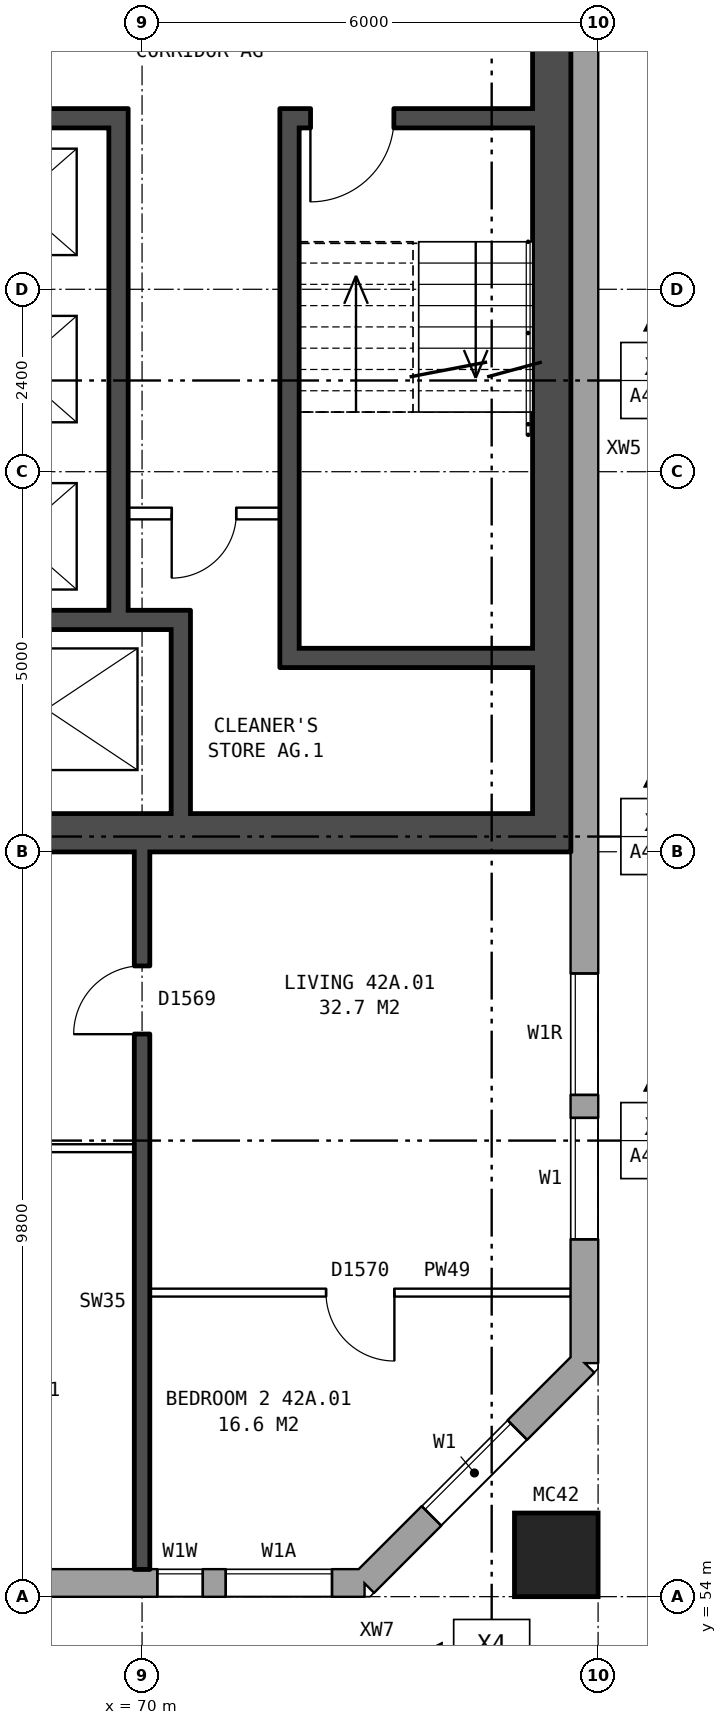
"""IFC4 building model, lengths in metres.
Left out: names, types, materials, properties, quantities, classifications, styles, units other than length and angle.
Written with IfcOpenShell. Run it as: python <this file> out.ifc"""

import sys

from ifc_helpers import new_model, si_unit, direction, frame, frame_2d, origin, origin_2d, place, context, subcontext, project, spatial, rectangle, hollow_rectangle, extrude, element, fill, save


model = new_model("IFC4")
c1 = context("Model", 3, precision=1e-05, world=origin(), true_north=direction((0.0, 1.0)))
c2 = subcontext(c1, "Body", "Model", "MODEL_VIEW")
j1 = project(units=[si_unit("LENGTHUNIT", "METRE"), si_unit("PLANEANGLEUNIT", "RADIAN")], contexts=[c1])
p1 = place(None, origin())
s1 = spatial("IfcSite", under=j1, at=p1, CompositionType="ELEMENT")
p2 = place(p1, origin())
s2 = spatial("IfcBuilding", under=s1, at=p2, CompositionType="ELEMENT")
p3 = place(p2, frame((0.0, 0.0, 151.6)))
s3 = spatial("IfcBuildingStorey", under=s2, at=p3, CompositionType="ELEMENT", Elevation=151.6)
p4 = place(p3, frame((75.45, 54.55, 0.0), z_axis=(0.0, 0.0, 1.0), x_axis=(1.0, 0.0, 0.0)))
e1 = element("IfcColumn", 1, at=p4, inside=s3, PredefinedType="COLUMN", context=c2, shape_type="SweptSolid", body=[
    extrude(hollow_rectangle(XDim=1.1, YDim=1.1, WallThickness=0.06, at=origin_2d()), origin(), (0.0, 0.0, 1.0), 3.1),
])
p5 = place(p3, frame((31.575, 54.18, 0.0), z_axis=(0.0, 0.0, 1.0), x_axis=(1.0, 0.0, 0.0)))
e2 = element("IfcWall", 2, at=p5, inside=s3, PredefinedType="STANDARD", context=c2, shape_type="SweptSolid", body=[
    extrude(rectangle(XDim=41.351, YDim=0.36, at=frame_2d((20.675, 0.0))), origin(), (0.0, 0.0, 1.0), 2.85),
])
p6 = place(p5, frame((4.625, 0.0, 0.8)))
e3 = element("IfcOpeningElement", 3, at=p6, cuts=e2, PredefinedType="OPENING", context=c2, shape_type="SweptSolid", body=[
    extrude(rectangle(XDim=1.2, YDim=1.2, at=frame_2d((0.6, 0.6))), frame((0.0, 0.19, 0.0), z_axis=(0.0, -1.0, 0.0), x_axis=(1.0, 0.0, 0.0)), (0.0, 0.0, 1.0), 0.38),
])
p7 = place(p5, frame((6.125, 0.0, 0.8)))
e4 = element("IfcOpeningElement", 4, at=p7, cuts=e2, PredefinedType="OPENING", context=c2, shape_type="SweptSolid", body=[
    extrude(rectangle(XDim=1.6, YDim=1.8, at=frame_2d((0.8, 0.9))), frame((0.0, 0.19, 0.0), z_axis=(0.0, -1.0, 0.0), x_axis=(1.0, 0.0, 0.0)), (0.0, 0.0, 1.0), 0.38),
])
p8 = place(p5, frame((9.125, 0.0, 0.8)))
e5 = element("IfcOpeningElement", 5, at=p8, cuts=e2, PredefinedType="OPENING", context=c2, shape_type="SweptSolid", body=[
    extrude(rectangle(XDim=1.6, YDim=1.8, at=frame_2d((0.8, 0.9))), frame((0.0, 0.19, 0.0), z_axis=(0.0, -1.0, 0.0), x_axis=(1.0, 0.0, 0.0)), (0.0, 0.0, 1.0), 0.38),
])
p9 = place(p5, frame((12.125, 0.0, 0.8)))
e6 = element("IfcOpeningElement", 6, at=p9, cuts=e2, PredefinedType="OPENING", context=c2, shape_type="SweptSolid", body=[
    extrude(rectangle(XDim=1.6, YDim=1.8, at=frame_2d((0.8, 0.9))), frame((0.0, 0.19, 0.0), z_axis=(0.0, -1.0, 0.0), x_axis=(1.0, 0.0, 0.0)), (0.0, 0.0, 1.0), 0.38),
])
p10 = place(p5, frame((15.125, 0.0, 0.8)))
e7 = element("IfcOpeningElement", 7, at=p10, cuts=e2, PredefinedType="OPENING", context=c2, shape_type="SweptSolid", body=[
    extrude(rectangle(XDim=1.6, YDim=1.8, at=frame_2d((0.8, 0.9))), frame((0.0, 0.19, 0.0), z_axis=(0.0, -1.0, 0.0), x_axis=(1.0, 0.0, 0.0)), (0.0, 0.0, 1.0), 0.38),
])
p11 = place(p5, frame((18.125, 0.0, 0.8)))
e8 = element("IfcOpeningElement", 8, at=p11, cuts=e2, PredefinedType="OPENING", context=c2, shape_type="SweptSolid", body=[
    extrude(rectangle(XDim=1.6, YDim=1.8, at=frame_2d((0.8, 0.9))), frame((0.0, 0.19, 0.0), z_axis=(0.0, -1.0, 0.0), x_axis=(1.0, 0.0, 0.0)), (0.0, 0.0, 1.0), 0.38),
])
p12 = place(p5, frame((21.125, 0.0, 0.8)))
e9 = element("IfcOpeningElement", 9, at=p12, cuts=e2, PredefinedType="OPENING", context=c2, shape_type="SweptSolid", body=[
    extrude(rectangle(XDim=1.6, YDim=1.8, at=frame_2d((0.8, 0.9))), frame((0.0, 0.19, 0.0), z_axis=(0.0, -1.0, 0.0), x_axis=(1.0, 0.0, 0.0)), (0.0, 0.0, 1.0), 0.38),
])
p13 = place(p5, frame((24.125, 0.0, 0.8)))
e10 = element("IfcOpeningElement", 10, at=p13, cuts=e2, PredefinedType="OPENING", context=c2, shape_type="SweptSolid", body=[
    extrude(rectangle(XDim=1.6, YDim=1.8, at=frame_2d((0.8, 0.9))), frame((0.0, 0.19, 0.0), z_axis=(0.0, -1.0, 0.0), x_axis=(1.0, 0.0, 0.0)), (0.0, 0.0, 1.0), 0.38),
])
p14 = place(p5, frame((27.125, 0.0, 0.8)))
e11 = element("IfcOpeningElement", 11, at=p14, cuts=e2, PredefinedType="OPENING", context=c2, shape_type="SweptSolid", body=[
    extrude(rectangle(XDim=1.6, YDim=1.8, at=frame_2d((0.8, 0.9))), frame((0.0, 0.19, 0.0), z_axis=(0.0, -1.0, 0.0), x_axis=(1.0, 0.0, 0.0)), (0.0, 0.0, 1.0), 0.38),
])
p15 = place(p5, frame((30.125, 0.0, 0.8)))
e12 = element("IfcOpeningElement", 12, at=p15, cuts=e2, PredefinedType="OPENING", context=c2, shape_type="SweptSolid", body=[
    extrude(rectangle(XDim=1.6, YDim=1.8, at=frame_2d((0.8, 0.9))), frame((0.0, 0.19, 0.0), z_axis=(0.0, -1.0, 0.0), x_axis=(1.0, 0.0, 0.0)), (0.0, 0.0, 1.0), 0.38),
])
p16 = place(p5, frame((33.125, 0.0, 0.8)))
e13 = element("IfcOpeningElement", 13, at=p16, cuts=e2, PredefinedType="OPENING", context=c2, shape_type="SweptSolid", body=[
    extrude(rectangle(XDim=1.6, YDim=1.8, at=frame_2d((0.8, 0.9))), frame((0.0, 0.19, 0.0), z_axis=(0.0, -1.0, 0.0), x_axis=(1.0, 0.0, 0.0)), (0.0, 0.0, 1.0), 0.38),
])
p17 = place(p5, frame((35.025, 0.0, 0.8)))
e14 = element("IfcOpeningElement", 14, at=p17, cuts=e2, PredefinedType="OPENING", context=c2, shape_type="SweptSolid", body=[
    extrude(rectangle(XDim=0.8, YDim=1.8, at=frame_2d((0.4, 0.9))), frame((0.0, 0.19, 0.0), z_axis=(0.0, -1.0, 0.0), x_axis=(1.0, 0.0, 0.0)), (0.0, 0.0, 1.0), 0.38),
])
p18 = place(p5, frame((38.625, 0.0, 1.5)))
e15 = element("IfcOpeningElement", 15, at=p18, cuts=e2, PredefinedType="OPENING", context=c2, shape_type="SweptSolid", body=[
    extrude(rectangle(XDim=0.6, YDim=0.9, at=frame_2d((0.3, 0.45))), frame((0.0, 0.19, 0.0), z_axis=(0.0, -1.0, 0.0), x_axis=(1.0, 0.0, 0.0)), (0.0, 0.0, 1.0), 0.38),
])
p19 = place(p5, frame((36.125, 0.0, 0.8)))
e16 = element("IfcOpeningElement", 16, at=p19, cuts=e2, PredefinedType="OPENING", context=c2, shape_type="SweptSolid", body=[
    extrude(rectangle(XDim=1.0, YDim=0.9, at=frame_2d((0.5, 0.45))), frame((0.0, 0.19, 0.0), z_axis=(0.0, -1.0, 0.0), x_axis=(1.0, 0.0, 0.0)), (0.0, 0.0, 1.0), 0.38),
])
p20 = place(p5, frame((39.525, 0.0, 0.8)))
e17 = element("IfcOpeningElement", 17, at=p20, cuts=e2, PredefinedType="OPENING", context=c2, shape_type="SweptSolid", body=[
    extrude(rectangle(XDim=1.4, YDim=1.8, at=frame_2d((0.7, 0.9))), frame((0.0, 0.19, 0.0), z_axis=(0.0, -1.0, 0.0), x_axis=(1.0, 0.0, 0.0)), (0.0, 0.0, 1.0), 0.38),
])
p21 = place(p3, frame((72.925, 54.18, 0.0), z_axis=(0.0, 0.0, 1.0), x_axis=(0.707106781187, 0.707106781187, 0.0)))
e18 = element("IfcWall", 18, at=p21, inside=s3, PredefinedType="STANDARD", context=c2, shape_type="SweptSolid", body=[
    extrude(rectangle(XDim=4.094, YDim=0.36, at=frame_2d((2.047, 0.0))), origin(), (0.0, 0.0, 1.0), 2.85),
])
p22 = place(p21, frame((1.247, 0.0, 0.8)))
e19 = element("IfcOpeningElement", 19, at=p22, cuts=e18, PredefinedType="OPENING", context=c2, shape_type="SweptSolid", body=[
    extrude(rectangle(XDim=1.6, YDim=1.8, at=frame_2d((0.8, 0.9))), frame((0.0, 0.19, 0.0), z_axis=(0.0, -1.0, 0.0), x_axis=(1.0, 0.0, 0.0)), (0.0, 0.0, 1.0), 0.38),
])
p23 = place(p3, frame((75.82, 57.075, 0.0), z_axis=(0.0, 0.0, 1.0), x_axis=(0.0, 1.0, 0.0)))
e20 = element("IfcWall", 20, at=p23, inside=s3, PredefinedType="STANDARD", context=c2, shape_type="SweptSolid", body=[
    extrude(rectangle(XDim=25.851, YDim=0.36, at=frame_2d((12.925, 0.0))), origin(), (0.0, 0.0, 1.0), 2.85),
])
p24 = place(p23, frame((1.625, 0.0, 0.8)))
e21 = element("IfcOpeningElement", 21, at=p24, cuts=e20, PredefinedType="OPENING", context=c2, shape_type="SweptSolid", body=[
    extrude(rectangle(XDim=1.6, YDim=1.8, at=frame_2d((0.8, 0.9))), frame((0.0, 0.19, 0.0), z_axis=(0.0, -1.0, 0.0), x_axis=(1.0, 0.0, 0.0)), (0.0, 0.0, 1.0), 0.38),
])
p25 = place(p23, frame((3.525, 0.0, 1.7)))
e22 = element("IfcOpeningElement", 22, at=p25, cuts=e20, PredefinedType="OPENING", context=c2, shape_type="SweptSolid", body=[
    extrude(rectangle(XDim=1.6, YDim=0.9, at=frame_2d((0.8, 0.45))), frame((0.0, 0.19, 0.0), z_axis=(0.0, -1.0, 0.0), x_axis=(1.0, 0.0, 0.0)), (0.0, 0.0, 1.0), 0.38),
])
p26 = place(p23, frame((19.475, 0.0, 0.35)))
e23 = element("IfcOpeningElement", 23, at=p26, cuts=e20, PredefinedType="OPENING", context=c2, shape_type="SweptSolid", body=[
    extrude(rectangle(XDim=1.0, YDim=0.9, at=frame_2d((0.5, 0.45))), frame((0.0, 0.19, 0.0), z_axis=(0.0, -1.0, 0.0), x_axis=(1.0, 0.0, 0.0)), (0.0, 0.0, 1.0), 0.38),
])
p27 = place(p23, frame((22.625, 0.0, 0.8)))
e24 = element("IfcOpeningElement", 24, at=p27, cuts=e20, PredefinedType="OPENING", context=c2, shape_type="SweptSolid", body=[
    extrude(rectangle(XDim=1.6, YDim=1.8, at=frame_2d((0.8, 0.9))), frame((0.0, 0.19, 0.0), z_axis=(0.0, -1.0, 0.0), x_axis=(1.0, 0.0, 0.0)), (0.0, 0.0, 1.0), 0.38),
])
p28 = place(p23, frame((20.825, 0.0, 1.65)))
e25 = element("IfcOpeningElement", 25, at=p28, cuts=e20, PredefinedType="OPENING", context=c2, shape_type="SweptSolid", body=[
    extrude(rectangle(XDim=0.8, YDim=0.9, at=frame_2d((0.4, 0.45))), frame((0.0, 0.19, 0.0), z_axis=(0.0, -1.0, 0.0), x_axis=(1.0, 0.0, 0.0)), (0.0, 0.0, 1.0), 0.38),
])
p29 = place(p3, frame((75.39, 63.8, 0.0), z_axis=(0.0, 0.0, 1.0), x_axis=(0.0, 1.0, 0.0)))
e26 = element("IfcWall", 26, at=p29, inside=s3, PredefinedType="SHEAR", context=c2, shape_type="SweptSolid", body=[
    extrude(rectangle(XDim=12.4, YDim=0.5, at=frame_2d((6.2, 0.0))), origin(), (0.0, 0.0, 1.0), 2.85),
])
p30 = place(p3, frame((67.14, 64.05, 0.0), z_axis=(0.0, 0.0, 1.0), x_axis=(1.0, 0.0, 0.0)))
e27 = element("IfcWall", 27, at=p30, inside=s3, PredefinedType="SHEAR", context=c2, shape_type="SweptSolid", body=[
    extrude(rectangle(XDim=8.0, YDim=0.5, at=frame_2d((4.0, 0.0))), origin(), (0.0, 0.0, 1.0), 2.85),
])
p31 = place(p3, frame((72.065, 66.35, 0.0), z_axis=(0.0, 0.0, 1.0), x_axis=(1.0, 0.0, 0.0)))
e28 = element("IfcWall", 28, at=p31, inside=s3, PredefinedType="SHEAR", context=c2, shape_type="SweptSolid", body=[
    extrude(rectangle(XDim=3.075, YDim=0.25, at=frame_2d((1.538, 0.0))), origin(), (0.0, 0.0, 1.0), 2.85),
])
p32 = place(p3, frame((67.14, 66.85, 0.0), z_axis=(0.0, 0.0, 1.0), x_axis=(1.0, 0.0, 0.0)))
e29 = element("IfcWall", 29, at=p32, inside=s3, PredefinedType="SHEAR", context=c2, shape_type="SweptSolid", body=[
    extrude(rectangle(XDim=3.495, YDim=0.25, at=frame_2d((1.748, 0.0))), origin(), (0.0, 0.0, 1.0), 2.85),
])
p33 = place(p3, frame((69.815, 68.25, 0.0), z_axis=(0.0, 0.0, 1.0), x_axis=(1.0, 0.0, 0.0)))
e30 = element("IfcWall", 30, at=p33, inside=s3, PredefinedType="PARTITIONING", context=c2, shape_type="SweptSolid", body=[
    extrude(rectangle(XDim=2.0, YDim=0.15, at=frame_2d((1.0, 0.0))), origin(), (0.0, 0.0, 1.0), 2.85),
])
p34 = place(p33, frame((0.575, 0.0, 0.0)))
e31 = element("IfcOpeningElement", 31, at=p34, cuts=e30, PredefinedType="OPENING", context=c2, shape_type="SweptSolid", body=[
    extrude(rectangle(XDim=0.85, YDim=2.1, at=frame_2d((0.425, 1.05))), frame((0.0, 0.085, 0.0), z_axis=(0.0, -1.0, 0.0), x_axis=(1.0, 0.0, 0.0)), (0.0, 0.0, 1.0), 0.17),
])
p35 = place(p3, frame((67.14, 73.45, 0.0), z_axis=(0.0, 0.0, 1.0), x_axis=(1.0, 0.0, 0.0)))
e32 = element("IfcWall", 32, at=p35, inside=s3, PredefinedType="SHEAR", context=c2, shape_type="SweptSolid", body=[
    extrude(rectangle(XDim=2.425, YDim=0.25, at=frame_2d((1.212, 0.0))), origin(), (0.0, 0.0, 1.0), 2.85),
])
p36 = place(p3, frame((72.065, 73.45, 0.0), z_axis=(0.0, 0.0, 1.0), x_axis=(1.0, 0.0, 0.0)))
e33 = element("IfcWall", 33, at=p36, inside=s3, PredefinedType="SHEAR", context=c2, shape_type="SweptSolid", body=[
    extrude(rectangle(XDim=3.075, YDim=0.25, at=frame_2d((1.538, 0.0))), origin(), (0.0, 0.0, 1.0), 2.85),
])
p37 = place(p36, frame((0.15, 0.0, 0.0)))
e34 = element("IfcOpeningElement", 34, at=p37, cuts=e33, PredefinedType="OPENING", context=c2, shape_type="SweptSolid", body=[
    extrude(rectangle(XDim=1.1, YDim=2.1, at=frame_2d((0.55, 1.05))), frame((0.0, 0.135, 0.0), z_axis=(0.0, -1.0, 0.0), x_axis=(1.0, 0.0, 0.0)), (0.0, 0.0, 1.0), 0.27),
])
p38 = place(p3, frame((69.69, 66.975, 0.0), z_axis=(0.0, 0.0, 1.0), x_axis=(0.0, 1.0, 0.0)))
e35 = element("IfcWall", 35, at=p38, inside=s3, PredefinedType="SHEAR", context=c2, shape_type="SweptSolid", body=[
    extrude(rectangle(XDim=6.6, YDim=0.25, at=frame_2d((3.3, 0.0))), origin(), (0.0, 0.0, 1.0), 2.85),
])
p39 = place(p3, frame((70.51, 64.3, 0.0), z_axis=(0.0, 0.0, 1.0), x_axis=(0.0, 1.0, 0.0)))
e36 = element("IfcWall", 36, at=p39, inside=s3, PredefinedType="SHEAR", context=c2, shape_type="SweptSolid", body=[
    extrude(rectangle(XDim=2.425, YDim=0.25, at=frame_2d((1.212, 0.0))), origin(), (0.0, 0.0, 1.0), 2.85),
])
p40 = place(p3, frame((71.94, 66.225, 0.0), z_axis=(0.0, 0.0, 1.0), x_axis=(0.0, 1.0, 0.0)))
e37 = element("IfcWall", 37, at=p40, inside=s3, PredefinedType="SHEAR", context=c2, shape_type="SweptSolid", body=[
    extrude(rectangle(XDim=7.35, YDim=0.25, at=frame_2d((3.675, 0.0))), origin(), (0.0, 0.0, 1.0), 2.85),
])
p41 = place(p3, frame((70.1, 58.0, 0.0), z_axis=(0.0, 0.0, 1.0), x_axis=(1.0, 0.0, 0.0)))
e38 = element("IfcWall", 38, at=p41, inside=s3, PredefinedType="PARTITIONING", context=c2, shape_type="SweptSolid", body=[
    extrude(rectangle(XDim=5.54, YDim=0.1, at=frame_2d((2.77, 0.0))), origin(), (0.0, 0.0, 1.0), 2.85),
])
p42 = place(p41, frame((2.32, 0.0, 0.0)))
e39 = element("IfcOpeningElement", 39, at=p42, cuts=e38, PredefinedType="OPENING", context=c2, shape_type="SweptSolid", body=[
    extrude(rectangle(XDim=0.9, YDim=2.1, at=frame_2d((0.45, 1.05))), frame((0.0, 0.06, 0.0), z_axis=(0.0, -1.0, 0.0), x_axis=(1.0, 0.0, 0.0)), (0.0, 0.0, 1.0), 0.12),
])
p43 = place(p3, frame((64.1, 59.9, 0.0), z_axis=(0.0, 0.0, 1.0), x_axis=(1.0, 0.0, 0.0)))
e40 = element("IfcWall", 40, at=p43, inside=s3, PredefinedType="PARTITIONING", context=c2, shape_type="SweptSolid", body=[
    extrude(rectangle(XDim=5.8, YDim=0.1, at=frame_2d((2.9, 0.0))), origin(), (0.0, 0.0, 1.0), 2.85),
])
p44 = place(p43, frame((3.6, 0.0, 0.0)))
e41 = element("IfcOpeningElement", 41, at=p44, cuts=e40, PredefinedType="OPENING", context=c2, shape_type="SweptSolid", body=[
    extrude(rectangle(XDim=0.9, YDim=2.1, at=frame_2d((0.45, 1.05))), frame((0.0, 0.06, 0.0), z_axis=(0.0, -1.0, 0.0), x_axis=(1.0, 0.0, 0.0)), (0.0, 0.0, 1.0), 0.12),
])
p45 = place(p43, frame((0.7, 0.0, 0.0)))
e42 = element("IfcOpeningElement", 42, at=p45, cuts=e40, PredefinedType="OPENING", context=c2, shape_type="SweptSolid", body=[
    extrude(rectangle(XDim=0.9, YDim=2.1, at=frame_2d((0.45, 1.05))), frame((0.0, 0.06, 0.0), z_axis=(0.0, -1.0, 0.0), x_axis=(1.0, 0.0, 0.0)), (0.0, 0.0, 1.0), 0.12),
])
p46 = place(p3, frame((70.0, 54.36, 0.0), z_axis=(0.0, 0.0, 1.0), x_axis=(0.0, 1.0, 0.0)))
e43 = element("IfcWall", 43, at=p46, inside=s3, PredefinedType="SOLIDWALL", context=c2, shape_type="SweptSolid", body=[
    extrude(rectangle(XDim=9.44, YDim=0.2, at=frame_2d((4.72, 0.0))), origin(), (0.0, 0.0, 1.0), 2.85),
])
p47 = place(p46, frame((7.04, 0.0, 0.0)))
e44 = element("IfcOpeningElement", 44, at=p47, cuts=e43, PredefinedType="OPENING", context=c2, shape_type="SweptSolid", body=[
    extrude(rectangle(XDim=0.9, YDim=2.1, at=frame_2d((0.45, 1.05))), frame((0.0, 0.11, 0.0), z_axis=(0.0, -1.0, 0.0), x_axis=(1.0, 0.0, 0.0)), (0.0, 0.0, 1.0), 0.22),
])
p48 = place(p18, origin())
e45 = element("IfcWindow", 45, at=p48, inside=s3, PartitioningType="SINGLE_PANEL", PredefinedType="WINDOW", context=c2, shape_type="SweptSolid", body=[
    extrude(rectangle(XDim=0.6, YDim=0.9, at=frame_2d((0.3, 0.45))), frame((0.0, 0.15, 0.0), z_axis=(0.0, -1.0, 0.0), x_axis=(1.0, 0.0, 0.0)), (0.0, 0.0, 1.0), 0.06),
])
fill(e15, e45)
p49 = place(p22, origin())
e46 = element("IfcWindow", 46, at=p49, inside=s3, PartitioningType="SINGLE_PANEL", PredefinedType="WINDOW", context=c2, shape_type="SweptSolid", body=[
    extrude(rectangle(XDim=1.6, YDim=1.8, at=frame_2d((0.8, 0.9))), frame((0.0, 0.15, 0.0), z_axis=(0.0, -1.0, 0.0), x_axis=(1.0, 0.0, 0.0)), (0.0, 0.0, 1.0), 0.06),
])
fill(e19, e46)
p50 = place(p24, origin())
e47 = element("IfcWindow", 47, at=p50, inside=s3, PartitioningType="SINGLE_PANEL", PredefinedType="WINDOW", context=c2, shape_type="SweptSolid", body=[
    extrude(rectangle(XDim=1.6, YDim=1.8, at=frame_2d((0.8, 0.9))), frame((0.0, 0.15, 0.0), z_axis=(0.0, -1.0, 0.0), x_axis=(1.0, 0.0, 0.0)), (0.0, 0.0, 1.0), 0.06),
])
fill(e21, e47)
p51 = place(p25, origin())
e48 = element("IfcWindow", 48, at=p51, inside=s3, PartitioningType="SINGLE_PANEL", PredefinedType="WINDOW", context=c2, shape_type="SweptSolid", body=[
    extrude(rectangle(XDim=1.6, YDim=0.9, at=frame_2d((0.8, 0.45))), frame((0.0, 0.15, 0.0), z_axis=(0.0, -1.0, 0.0), x_axis=(1.0, 0.0, 0.0)), (0.0, 0.0, 1.0), 0.06),
])
fill(e22, e48)
p52 = place(p37, frame((1.1, 0.0, 0.0), z_axis=(0.0, 0.0, 1.0), x_axis=(-1.0, 0.0, 0.0)))
e49 = element("IfcDoor", 49, at=p52, inside=s3, OperationType="SINGLE_SWING_RIGHT", PredefinedType="DOOR", context=c2, shape_type="SweptSolid", body=[
    extrude(rectangle(XDim=1.1, YDim=2.1, at=frame_2d((0.55, 1.05))), frame((0.0, 0.025, 0.0), z_axis=(0.0, -1.0, 0.0), x_axis=(1.0, 0.0, 0.0)), (0.0, 0.0, 1.0), 0.05),
])
fill(e34, e49)
p53 = place(p34, frame((0.85, 0.0, 0.0), z_axis=(0.0, 0.0, 1.0), x_axis=(-1.0, 0.0, 0.0)))
e50 = element("IfcDoor", 50, at=p53, inside=s3, OperationType="SINGLE_SWING_RIGHT", PredefinedType="DOOR", context=c2, shape_type="SweptSolid", body=[
    extrude(rectangle(XDim=0.85, YDim=2.1, at=frame_2d((0.425, 1.05))), frame((0.0, 0.025, 0.0), z_axis=(0.0, -1.0, 0.0), x_axis=(1.0, 0.0, 0.0)), (0.0, 0.0, 1.0), 0.05),
])
fill(e31, e50)
p54 = place(p42, frame((0.9, 0.0, 0.0), z_axis=(0.0, 0.0, 1.0), x_axis=(-1.0, 0.0, 0.0)))
e51 = element("IfcDoor", 51, at=p54, inside=s3, OperationType="SINGLE_SWING_LEFT", PredefinedType="DOOR", context=c2, shape_type="SweptSolid", body=[
    extrude(rectangle(XDim=0.9, YDim=2.1, at=frame_2d((0.45, 1.05))), frame((0.0, 0.025, 0.0), z_axis=(0.0, -1.0, 0.0), x_axis=(1.0, 0.0, 0.0)), (0.0, 0.0, 1.0), 0.05),
])
fill(e39, e51)
p55 = place(p47, origin())
e52 = element("IfcDoor", 52, at=p55, inside=s3, OperationType="SINGLE_SWING_LEFT", PredefinedType="DOOR", context=c2, shape_type="SweptSolid", body=[
    extrude(rectangle(XDim=0.9, YDim=2.1, at=frame_2d((0.45, 1.05))), frame((0.0, 0.025, 0.0), z_axis=(0.0, -1.0, 0.0), x_axis=(1.0, 0.0, 0.0)), (0.0, 0.0, 1.0), 0.05),
])
fill(e44, e52)
p56 = place(p20, origin())
e53 = element("IfcWindow", 53, at=p56, inside=s3, PartitioningType="SINGLE_PANEL", PredefinedType="WINDOW", context=c2, shape_type="SweptSolid", body=[
    extrude(rectangle(XDim=1.4, YDim=1.8, at=frame_2d((0.7, 0.9))), frame((0.0, 0.15, 0.0), z_axis=(0.0, -1.0, 0.0), x_axis=(1.0, 0.0, 0.0)), (0.0, 0.0, 1.0), 0.06),
])
fill(e17, e53)
save(model, sys.argv[1])
